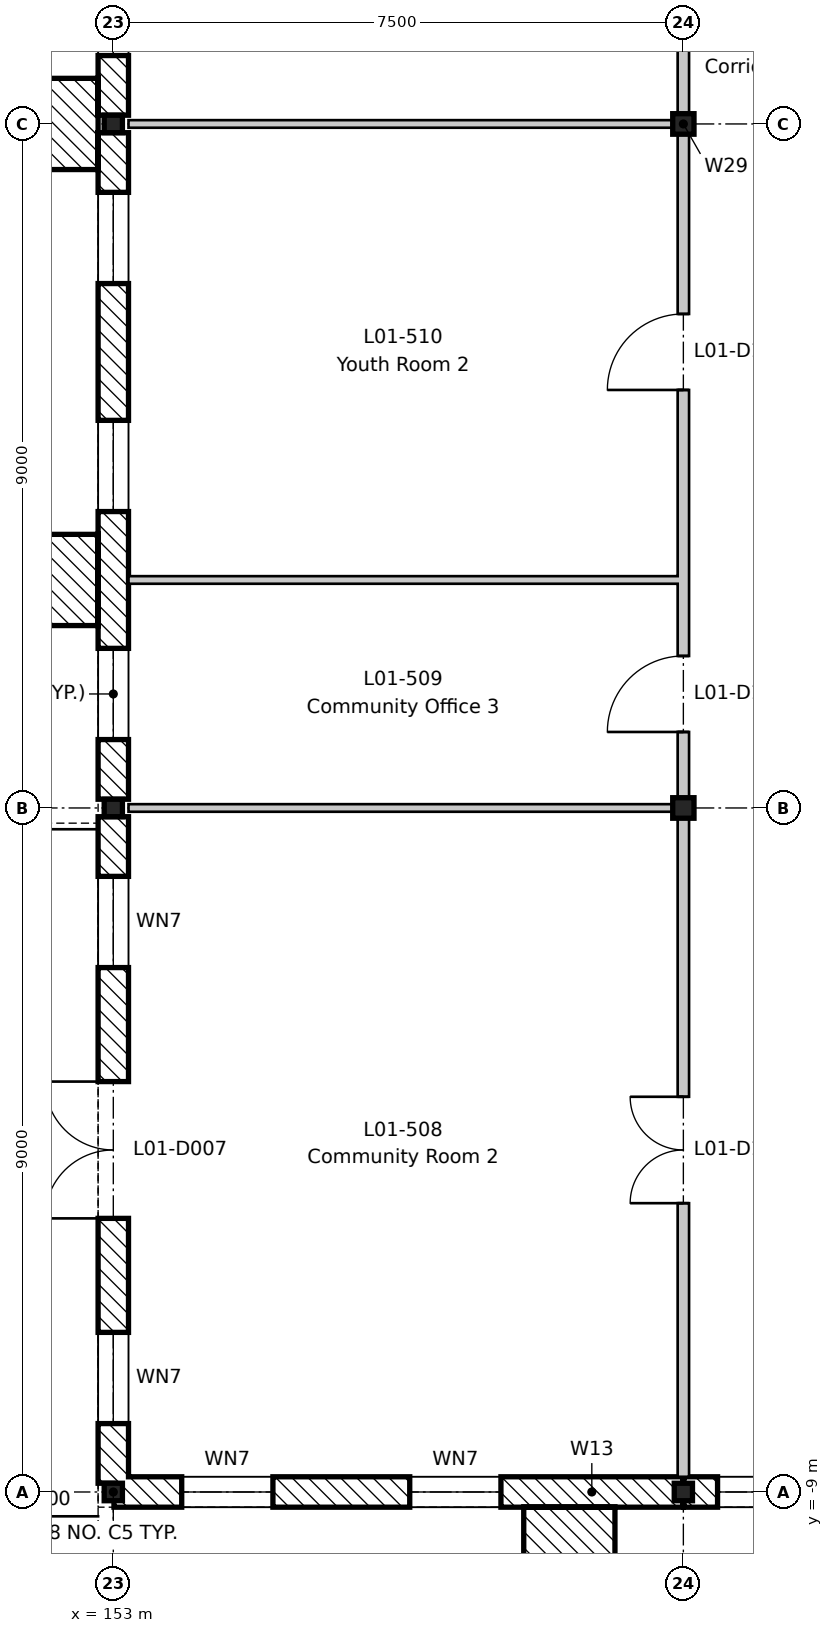
"""IFC4 building model, lengths in metres.
Left out: names, types, materials, properties, quantities, classifications, styles, units other than length and angle.
Written with IfcOpenShell. Run it as: python <this file> out.ifc"""

import sys

from ifc_helpers import new_model, si_unit, direction, frame, frame_2d, origin, origin_2d, place, context, subcontext, project, spatial, rectangle, i_section, extrude, element, fill, save


model = new_model("IFC4")
c1 = context("Model", 3, precision=1e-05, world=origin(), true_north=direction((0.0, 1.0)))
c2 = subcontext(c1, "Body", "Model", "MODEL_VIEW")
j1 = project(units=[si_unit("LENGTHUNIT", "METRE"), si_unit("PLANEANGLEUNIT", "RADIAN")], contexts=[c1])
p1 = place(None, origin())
s1 = spatial("IfcSite", under=j1, at=p1, CompositionType="ELEMENT")
p2 = place(p1, origin())
s2 = spatial("IfcBuilding", under=s1, at=p2, CompositionType="ELEMENT")
p3 = place(p2, frame((0.0, 0.0, 5.4)))
s3 = spatial("IfcBuildingStorey", under=s2, at=p3, CompositionType="ELEMENT", Elevation=5.4)
for number, where, z_axis, x_axis in (
    (1, (153.0, -9.0, -0.2), (0.0, 0.0, 1.0), (1.0, 0.0, 0.0)),
    (2, (153.0, 0.0, -0.2), (0.0, 0.0, 1.0), (1.0, 0.0, 0.0)),
    (3, (153.0, 9.0, -0.2), (0.0, 0.0, 1.0), (1.0, 0.0, 0.0)),
    (4, (160.5, -9.0, -0.2), (0.0, 0.0, 1.0), (1.0, 0.0, 0.0)),
):
    element("IfcColumn", number, at=place(p3, frame(where, z_axis=z_axis, x_axis=x_axis)), inside=s3, PredefinedType="COLUMN", context=c2, shape_type="SweptSolid", body=[
        extrude(i_section(OverallWidth=0.24, OverallDepth=0.23, WebThickness=0.008, FlangeThickness=0.012, FilletRadius=0.021, at=origin_2d()), origin(), (0.0, 0.0, 1.0), 4.5),
    ])
for number, where, z_axis, x_axis in (
    (5, (160.5, 0.0, -0.2), (0.0, 0.0, 1.0), (1.0, 0.0, 0.0)),
    (6, (160.5, 9.0, -0.2), (0.0, 0.0, 1.0), (1.0, 0.0, 0.0)),
):
    element("IfcColumn", number, at=place(p3, frame(where, z_axis=z_axis, x_axis=x_axis)), inside=s3, PredefinedType="COLUMN", context=c2, shape_type="SweptSolid", body=[
        extrude(i_section(OverallWidth=0.28, OverallDepth=0.27, WebThickness=0.008, FlangeThickness=0.013, FilletRadius=0.024, at=origin_2d()), origin(), (0.0, 0.0, 1.0), 4.5),
    ])
p4 = place(p3, frame((153.0, -8.885, 0.0), z_axis=(0.0, 0.0, 1.0), x_axis=(0.0, 1.0, 0.0)))
e7 = element("IfcWall", 7, at=p4, inside=s3, PredefinedType="STANDARD", context=c2, shape_type="SweptSolid", body=[
    extrude(rectangle(XDim=8.77, YDim=0.4, at=frame_2d((4.385, 0.0))), origin(), (0.0, 0.0, 1.0), 3.9),
])
p5 = place(p4, frame((3.485, 0.0, 0.0)))
e8 = element("IfcOpeningElement", 8, at=p5, cuts=e7, PredefinedType="OPENING", context=c2, shape_type="SweptSolid", body=[
    extrude(rectangle(XDim=1.8, YDim=2.4, at=frame_2d((0.9, 1.2))), frame((0.0, 0.21, 0.0), z_axis=(0.0, -1.0, 0.0), x_axis=(1.0, 0.0, 0.0)), (0.0, 0.0, 1.0), 0.42),
])
p6 = place(p4, frame((0.785, 0.0, 0.9)))
e9 = element("IfcOpeningElement", 9, at=p6, cuts=e7, PredefinedType="OPENING", context=c2, shape_type="SweptSolid", body=[
    extrude(rectangle(XDim=1.2, YDim=2.4, at=frame_2d((0.6, 1.2))), frame((0.0, 0.21, 0.0), z_axis=(0.0, -1.0, 0.0), x_axis=(1.0, 0.0, 0.0)), (0.0, 0.0, 1.0), 0.42),
])
p7 = place(p4, frame((6.785, 0.0, 0.9)))
e10 = element("IfcOpeningElement", 10, at=p7, cuts=e7, PredefinedType="OPENING", context=c2, shape_type="SweptSolid", body=[
    extrude(rectangle(XDim=1.2, YDim=2.4, at=frame_2d((0.6, 1.2))), frame((0.0, 0.21, 0.0), z_axis=(0.0, -1.0, 0.0), x_axis=(1.0, 0.0, 0.0)), (0.0, 0.0, 1.0), 0.42),
])
p8 = place(p3, frame((153.0, 0.115, 0.0), z_axis=(0.0, 0.0, 1.0), x_axis=(0.0, 1.0, 0.0)))
e11 = element("IfcWall", 11, at=p8, inside=s3, PredefinedType="STANDARD", context=c2, shape_type="SweptSolid", body=[
    extrude(rectangle(XDim=8.77, YDim=0.4, at=frame_2d((4.385, 0.0))), origin(), (0.0, 0.0, 1.0), 3.9),
])
p9 = place(p8, frame((0.785, 0.0, 0.9)))
e12 = element("IfcOpeningElement", 12, at=p9, cuts=e11, PredefinedType="OPENING", context=c2, shape_type="SweptSolid", body=[
    extrude(rectangle(XDim=1.2, YDim=2.4, at=frame_2d((0.6, 1.2))), frame((0.0, 0.21, 0.0), z_axis=(0.0, -1.0, 0.0), x_axis=(1.0, 0.0, 0.0)), (0.0, 0.0, 1.0), 0.42),
])
p10 = place(p8, frame((3.785, 0.0, 0.9)))
e13 = element("IfcOpeningElement", 13, at=p10, cuts=e11, PredefinedType="OPENING", context=c2, shape_type="SweptSolid", body=[
    extrude(rectangle(XDim=1.2, YDim=2.4, at=frame_2d((0.6, 1.2))), frame((0.0, 0.21, 0.0), z_axis=(0.0, -1.0, 0.0), x_axis=(1.0, 0.0, 0.0)), (0.0, 0.0, 1.0), 0.42),
])
p11 = place(p8, frame((6.785, 0.0, 0.9)))
e14 = element("IfcOpeningElement", 14, at=p11, cuts=e11, PredefinedType="OPENING", context=c2, shape_type="SweptSolid", body=[
    extrude(rectangle(XDim=1.2, YDim=2.4, at=frame_2d((0.6, 1.2))), frame((0.0, 0.21, 0.0), z_axis=(0.0, -1.0, 0.0), x_axis=(1.0, 0.0, 0.0)), (0.0, 0.0, 1.0), 0.42),
])
p12 = place(p3, frame((153.0, 9.115, 0.0), z_axis=(0.0, 0.0, 1.0), x_axis=(0.0, 1.0, 0.0)))
e15 = element("IfcWall", 15, at=p12, inside=s3, PredefinedType="STANDARD", context=c2, shape_type="SweptSolid", body=[
    extrude(rectangle(XDim=8.77, YDim=0.4, at=frame_2d((4.385, 0.0))), origin(), (0.0, 0.0, 1.0), 3.9),
])
p13 = place(p12, frame((0.785, 0.0, 0.9)))
e16 = element("IfcOpeningElement", 16, at=p13, cuts=e15, PredefinedType="OPENING", context=c2, shape_type="SweptSolid", body=[
    extrude(rectangle(XDim=1.2, YDim=2.4, at=frame_2d((0.6, 1.2))), frame((0.0, 0.21, 0.0), z_axis=(0.0, -1.0, 0.0), x_axis=(1.0, 0.0, 0.0)), (0.0, 0.0, 1.0), 0.42),
])
p14 = place(p12, frame((3.785, 0.0, 0.9)))
e17 = element("IfcOpeningElement", 17, at=p14, cuts=e15, PredefinedType="OPENING", context=c2, shape_type="SweptSolid", body=[
    extrude(rectangle(XDim=1.2, YDim=2.4, at=frame_2d((0.6, 1.2))), frame((0.0, 0.21, 0.0), z_axis=(0.0, -1.0, 0.0), x_axis=(1.0, 0.0, 0.0)), (0.0, 0.0, 1.0), 0.42),
])
p15 = place(p12, frame((6.785, 0.0, 0.9)))
e18 = element("IfcOpeningElement", 18, at=p15, cuts=e15, PredefinedType="OPENING", context=c2, shape_type="SweptSolid", body=[
    extrude(rectangle(XDim=1.2, YDim=2.4, at=frame_2d((0.6, 1.2))), frame((0.0, 0.21, 0.0), z_axis=(0.0, -1.0, 0.0), x_axis=(1.0, 0.0, 0.0)), (0.0, 0.0, 1.0), 0.42),
])
p16 = place(p3, frame((160.491, -9.0, 0.0), z_axis=(0.0, 0.0, 1.0), x_axis=(-1.0, 0.0, 0.0)))
e19 = element("IfcWall", 19, at=p16, inside=s3, PredefinedType="STANDARD", context=c2, shape_type="SweptSolid", body=[
    extrude(rectangle(XDim=7.482, YDim=0.4, at=frame_2d((3.741, 0.0))), origin(), (0.0, 0.0, 1.0), 3.97),
])
p17 = place(p16, frame((5.391, 0.0, 0.9)))
e20 = element("IfcOpeningElement", 20, at=p17, cuts=e19, PredefinedType="OPENING", context=c2, shape_type="SweptSolid", body=[
    extrude(rectangle(XDim=1.2, YDim=2.4, at=frame_2d((0.6, 1.2))), frame((0.0, 0.21, 0.0), z_axis=(0.0, -1.0, 0.0), x_axis=(1.0, 0.0, 0.0)), (0.0, 0.0, 1.0), 0.42),
])
p18 = place(p16, frame((2.391, 0.0, 0.9)))
e21 = element("IfcOpeningElement", 21, at=p18, cuts=e19, PredefinedType="OPENING", context=c2, shape_type="SweptSolid", body=[
    extrude(rectangle(XDim=1.2, YDim=2.4, at=frame_2d((0.6, 1.2))), frame((0.0, 0.21, 0.0), z_axis=(0.0, -1.0, 0.0), x_axis=(1.0, 0.0, 0.0)), (0.0, 0.0, 1.0), 0.42),
])
p19 = place(p3, frame((163.491, -9.0, 0.0), z_axis=(0.0, 0.0, 1.0), x_axis=(-1.0, 0.0, 0.0)))
e22 = element("IfcWall", 22, at=p19, inside=s3, PredefinedType="STANDARD", context=c2, shape_type="SweptSolid", body=[
    extrude(rectangle(XDim=2.982, YDim=0.4, at=frame_2d((1.491, 0.0))), origin(), (0.0, 0.0, 1.0), 4.1),
])
p20 = place(p19, frame((0.441, 0.0, 0.9)))
e23 = element("IfcOpeningElement", 23, at=p20, cuts=e22, PredefinedType="OPENING", context=c2, shape_type="SweptSolid", body=[
    extrude(rectangle(XDim=2.1, YDim=2.1, at=frame_2d((1.05, 1.05))), frame((0.0, 0.21, 0.0), z_axis=(0.0, -1.0, 0.0), x_axis=(1.0, 0.0, 0.0)), (0.0, 0.0, 1.0), 0.42),
])
for number, where, z_axis, x_axis in (
    (24, (152.2, 2.4, 0.0), (0.0, 0.0, 1.0), (0.0, 1.0, 0.0)),
    (25, (152.2, 8.4, 0.0), (0.0, 0.0, 1.0), (0.0, 1.0, 0.0)),
    (26, (158.4, -9.8, 0.0), (0.0, 0.0, 1.0), (1.0, 0.0, 0.0)),
):
    element("IfcWall", number, at=place(p3, frame(where, z_axis=z_axis, x_axis=x_axis)), inside=s3, PredefinedType="STANDARD", context=c2, shape_type="SweptSolid", body=[
        extrude(rectangle(XDim=1.2, YDim=1.2, at=frame_2d((0.6, 0.0))), origin(), (0.0, 0.0, 1.0), 4.5),
    ])
p21 = place(p3, frame((153.2, 0.0, 0.0), z_axis=(0.0, 0.0, 1.0), x_axis=(1.0, 0.0, 0.0)))
e27 = element("IfcWall", 27, at=p21, inside=s3, PredefinedType="PARTITIONING", context=c2, shape_type="SweptSolid", body=[
    extrude(rectangle(XDim=7.225, YDim=0.1, at=frame_2d((3.613, 0.0))), origin(), (0.0, 0.0, 1.0), 3.95),
])
p22 = place(p3, frame((153.2, 3.0, 0.0), z_axis=(0.0, 0.0, 1.0), x_axis=(1.0, 0.0, 0.0)))
e28 = element("IfcWall", 28, at=p22, inside=s3, PredefinedType="PARTITIONING", context=c2, shape_type="SweptSolid", body=[
    extrude(rectangle(XDim=7.225, YDim=0.1, at=frame_2d((3.613, 0.0))), origin(), (0.0, 0.0, 1.0), 4.3),
])
p23 = place(p3, frame((153.2, 9.0, 0.0), z_axis=(0.0, 0.0, 1.0), x_axis=(1.0, 0.0, 0.0)))
e29 = element("IfcWall", 29, at=p23, inside=s3, PredefinedType="PARTITIONING", context=c2, shape_type="SweptSolid", body=[
    extrude(rectangle(XDim=7.225, YDim=0.1, at=frame_2d((3.613, 0.0))), origin(), (0.0, 0.0, 1.0), 3.95),
])
p24 = place(p3, frame((160.5, -8.8, 0.0), z_axis=(0.0, 0.0, 1.0), x_axis=(0.0, 1.0, 0.0)))
e30 = element("IfcWall", 30, at=p24, inside=s3, PredefinedType="PARTITIONING", context=c2, shape_type="SweptSolid", body=[
    extrude(rectangle(XDim=62.6, YDim=0.15, at=frame_2d((31.3, 0.0))), origin(), (0.0, 0.0, 1.0), 3.78),
])
p25 = place(p24, frame((3.6, 0.0, 0.0)))
e31 = element("IfcOpeningElement", 31, at=p25, cuts=e30, PredefinedType="OPENING", context=c2, shape_type="SweptSolid", body=[
    extrude(rectangle(XDim=1.4, YDim=2.1, at=frame_2d((0.7, 1.05))), frame((0.0, 0.085, 0.0), z_axis=(0.0, -1.0, 0.0), x_axis=(1.0, 0.0, 0.0)), (0.0, 0.0, 1.0), 0.17),
])
p26 = place(p24, frame((9.8, 0.0, 0.0)))
e32 = element("IfcOpeningElement", 32, at=p26, cuts=e30, PredefinedType="OPENING", context=c2, shape_type="SweptSolid", body=[
    extrude(rectangle(XDim=1.0, YDim=2.1, at=frame_2d((0.5, 1.05))), frame((0.0, 0.085, 0.0), z_axis=(0.0, -1.0, 0.0), x_axis=(1.0, 0.0, 0.0)), (0.0, 0.0, 1.0), 0.17),
])
p27 = place(p24, frame((14.3, 0.0, 0.0)))
e33 = element("IfcOpeningElement", 33, at=p27, cuts=e30, PredefinedType="OPENING", context=c2, shape_type="SweptSolid", body=[
    extrude(rectangle(XDim=1.0, YDim=2.1, at=frame_2d((0.5, 1.05))), frame((0.0, 0.085, 0.0), z_axis=(0.0, -1.0, 0.0), x_axis=(1.0, 0.0, 0.0)), (0.0, 0.0, 1.0), 0.17),
])
p28 = place(p24, frame((20.3, 0.0, 0.0)))
e34 = element("IfcOpeningElement", 34, at=p28, cuts=e30, PredefinedType="OPENING", context=c2, shape_type="SweptSolid", body=[
    extrude(rectangle(XDim=1.0, YDim=2.1, at=frame_2d((0.5, 1.05))), frame((0.0, 0.085, 0.0), z_axis=(0.0, -1.0, 0.0), x_axis=(1.0, 0.0, 0.0)), (0.0, 0.0, 1.0), 0.17),
])
p29 = place(p24, frame((24.8, 0.0, 0.0)))
e35 = element("IfcOpeningElement", 35, at=p29, cuts=e30, PredefinedType="OPENING", context=c2, shape_type="SweptSolid", body=[
    extrude(rectangle(XDim=1.0, YDim=2.1, at=frame_2d((0.5, 1.05))), frame((0.0, 0.085, 0.0), z_axis=(0.0, -1.0, 0.0), x_axis=(1.0, 0.0, 0.0)), (0.0, 0.0, 1.0), 0.17),
])
p30 = place(p24, frame((27.8, 0.0, 0.0)))
e36 = element("IfcOpeningElement", 36, at=p30, cuts=e30, PredefinedType="OPENING", context=c2, shape_type="SweptSolid", body=[
    extrude(rectangle(XDim=1.0, YDim=2.1, at=frame_2d((0.5, 1.05))), frame((0.0, 0.085, 0.0), z_axis=(0.0, -1.0, 0.0), x_axis=(1.0, 0.0, 0.0)), (0.0, 0.0, 1.0), 0.17),
])
p31 = place(p24, frame((32.3, 0.0, 0.0)))
e37 = element("IfcOpeningElement", 37, at=p31, cuts=e30, PredefinedType="OPENING", context=c2, shape_type="SweptSolid", body=[
    extrude(rectangle(XDim=1.0, YDim=2.1, at=frame_2d((0.5, 1.05))), frame((0.0, 0.085, 0.0), z_axis=(0.0, -1.0, 0.0), x_axis=(1.0, 0.0, 0.0)), (0.0, 0.0, 1.0), 0.17),
])
p32 = place(p24, frame((36.8, 0.0, 0.0)))
e38 = element("IfcOpeningElement", 38, at=p32, cuts=e30, PredefinedType="OPENING", context=c2, shape_type="SweptSolid", body=[
    extrude(rectangle(XDim=1.0, YDim=2.1, at=frame_2d((0.5, 1.05))), frame((0.0, 0.085, 0.0), z_axis=(0.0, -1.0, 0.0), x_axis=(1.0, 0.0, 0.0)), (0.0, 0.0, 1.0), 0.17),
])
p33 = place(p24, frame((39.8, 0.0, 0.0)))
e39 = element("IfcOpeningElement", 39, at=p33, cuts=e30, PredefinedType="OPENING", context=c2, shape_type="SweptSolid", body=[
    extrude(rectangle(XDim=1.0, YDim=2.1, at=frame_2d((0.5, 1.05))), frame((0.0, 0.085, 0.0), z_axis=(0.0, -1.0, 0.0), x_axis=(1.0, 0.0, 0.0)), (0.0, 0.0, 1.0), 0.17),
])
p34 = place(p24, frame((45.6, 0.0, 0.0)))
e40 = element("IfcOpeningElement", 40, at=p34, cuts=e30, PredefinedType="OPENING", context=c2, shape_type="SweptSolid", body=[
    extrude(rectangle(XDim=1.4, YDim=2.1, at=frame_2d((0.7, 1.05))), frame((0.0, 0.085, 0.0), z_axis=(0.0, -1.0, 0.0), x_axis=(1.0, 0.0, 0.0)), (0.0, 0.0, 1.0), 0.17),
])
p35 = place(p24, frame((54.55, 0.0, 0.0)))
e41 = element("IfcOpeningElement", 41, at=p35, cuts=e30, PredefinedType="OPENING", context=c2, shape_type="SweptSolid", body=[
    extrude(rectangle(XDim=1.0, YDim=2.1, at=frame_2d((0.5, 1.05))), frame((0.0, 0.085, 0.0), z_axis=(0.0, -1.0, 0.0), x_axis=(1.0, 0.0, 0.0)), (0.0, 0.0, 1.0), 0.17),
])
p36 = place(p24, frame((57.8, 0.0, 0.0)))
e42 = element("IfcOpeningElement", 42, at=p36, cuts=e30, PredefinedType="OPENING", context=c2, shape_type="SweptSolid", body=[
    extrude(rectangle(XDim=1.0, YDim=2.1, at=frame_2d((0.5, 1.05))), frame((0.0, 0.085, 0.0), z_axis=(0.0, -1.0, 0.0), x_axis=(1.0, 0.0, 0.0)), (0.0, 0.0, 1.0), 0.17),
])
p37 = place(p24, frame((60.8, 0.0, 0.0)))
e43 = element("IfcOpeningElement", 43, at=p37, cuts=e30, PredefinedType="OPENING", context=c2, shape_type="SweptSolid", body=[
    extrude(rectangle(XDim=1.0, YDim=2.1, at=frame_2d((0.5, 1.05))), frame((0.0, 0.085, 0.0), z_axis=(0.0, -1.0, 0.0), x_axis=(1.0, 0.0, 0.0)), (0.0, 0.0, 1.0), 0.17),
])
p38 = place(p5, origin())
e44 = element("IfcDoor", 44, at=p38, inside=s3, OperationType="DOUBLE_DOOR_SINGLE_SWING", PredefinedType="DOOR", context=c2, shape_type="SweptSolid", body=[
    extrude(rectangle(XDim=1.8, YDim=2.4, at=frame_2d((0.9, 1.2))), frame((0.0, 0.025, 0.0), z_axis=(0.0, -1.0, 0.0), x_axis=(1.0, 0.0, 0.0)), (0.0, 0.0, 1.0), 0.05),
])
fill(e8, e44)
p39 = place(p6, origin())
e45 = element("IfcWindow", 45, at=p39, inside=s3, PartitioningType="SINGLE_PANEL", PredefinedType="WINDOW", context=c2, shape_type="SweptSolid", body=[
    extrude(rectangle(XDim=1.2, YDim=2.4, at=frame_2d((0.6, 1.2))), frame((0.0, -0.12, 0.0), z_axis=(0.0, -1.0, 0.0), x_axis=(1.0, 0.0, 0.0)), (0.0, 0.0, 1.0), 0.06),
])
fill(e9, e45)
p40 = place(p7, origin())
e46 = element("IfcWindow", 46, at=p40, inside=s3, PartitioningType="SINGLE_PANEL", PredefinedType="WINDOW", context=c2, shape_type="SweptSolid", body=[
    extrude(rectangle(XDim=1.2, YDim=2.4, at=frame_2d((0.6, 1.2))), frame((0.0, -0.12, 0.0), z_axis=(0.0, -1.0, 0.0), x_axis=(1.0, 0.0, 0.0)), (0.0, 0.0, 1.0), 0.06),
])
fill(e10, e46)
p41 = place(p9, origin())
e47 = element("IfcWindow", 47, at=p41, inside=s3, PartitioningType="SINGLE_PANEL", PredefinedType="WINDOW", context=c2, shape_type="SweptSolid", body=[
    extrude(rectangle(XDim=1.2, YDim=2.4, at=frame_2d((0.6, 1.2))), frame((0.0, -0.12, 0.0), z_axis=(0.0, -1.0, 0.0), x_axis=(1.0, 0.0, 0.0)), (0.0, 0.0, 1.0), 0.06),
])
fill(e12, e47)
p42 = place(p10, origin())
e48 = element("IfcWindow", 48, at=p42, inside=s3, PartitioningType="SINGLE_PANEL", PredefinedType="WINDOW", context=c2, shape_type="SweptSolid", body=[
    extrude(rectangle(XDim=1.2, YDim=2.4, at=frame_2d((0.6, 1.2))), frame((0.0, -0.12, 0.0), z_axis=(0.0, -1.0, 0.0), x_axis=(1.0, 0.0, 0.0)), (0.0, 0.0, 1.0), 0.06),
])
fill(e13, e48)
p43 = place(p11, origin())
e49 = element("IfcWindow", 49, at=p43, inside=s3, PartitioningType="SINGLE_PANEL", PredefinedType="WINDOW", context=c2, shape_type="SweptSolid", body=[
    extrude(rectangle(XDim=1.2, YDim=2.4, at=frame_2d((0.6, 1.2))), frame((0.0, -0.12, 0.0), z_axis=(0.0, -1.0, 0.0), x_axis=(1.0, 0.0, 0.0)), (0.0, 0.0, 1.0), 0.06),
])
fill(e14, e49)
p44 = place(p13, origin())
e50 = element("IfcWindow", 50, at=p44, inside=s3, PartitioningType="SINGLE_PANEL", PredefinedType="WINDOW", context=c2, shape_type="SweptSolid", body=[
    extrude(rectangle(XDim=1.2, YDim=2.4, at=frame_2d((0.6, 1.2))), frame((0.0, -0.12, 0.0), z_axis=(0.0, -1.0, 0.0), x_axis=(1.0, 0.0, 0.0)), (0.0, 0.0, 1.0), 0.06),
])
fill(e16, e50)
p45 = place(p17, origin())
e51 = element("IfcWindow", 51, at=p45, inside=s3, PartitioningType="SINGLE_PANEL", PredefinedType="WINDOW", context=c2, shape_type="SweptSolid", body=[
    extrude(rectangle(XDim=1.2, YDim=2.4, at=frame_2d((0.6, 1.2))), frame((0.0, -0.12, 0.0), z_axis=(0.0, -1.0, 0.0), x_axis=(1.0, 0.0, 0.0)), (0.0, 0.0, 1.0), 0.06),
])
fill(e20, e51)
p46 = place(p18, origin())
e52 = element("IfcWindow", 52, at=p46, inside=s3, PartitioningType="SINGLE_PANEL", PredefinedType="WINDOW", context=c2, shape_type="SweptSolid", body=[
    extrude(rectangle(XDim=1.2, YDim=2.4, at=frame_2d((0.6, 1.2))), frame((0.0, -0.12, 0.0), z_axis=(0.0, -1.0, 0.0), x_axis=(1.0, 0.0, 0.0)), (0.0, 0.0, 1.0), 0.06),
])
fill(e21, e52)
p47 = place(p20, origin())
e53 = element("IfcWindow", 53, at=p47, inside=s3, PartitioningType="SINGLE_PANEL", PredefinedType="WINDOW", context=c2, shape_type="SweptSolid", body=[
    extrude(rectangle(XDim=2.1, YDim=2.1, at=frame_2d((1.05, 1.05))), frame((0.0, -0.12, 0.0), z_axis=(0.0, -1.0, 0.0), x_axis=(1.0, 0.0, 0.0)), (0.0, 0.0, 1.0), 0.06),
])
fill(e23, e53)
p48 = place(p25, origin())
e54 = element("IfcDoor", 54, at=p48, inside=s3, OperationType="DOUBLE_DOOR_SINGLE_SWING", PredefinedType="DOOR", context=c2, shape_type="SweptSolid", body=[
    extrude(rectangle(XDim=1.4, YDim=2.1, at=frame_2d((0.7, 1.05))), frame((0.0, 0.025, 0.0), z_axis=(0.0, -1.0, 0.0), x_axis=(1.0, 0.0, 0.0)), (0.0, 0.0, 1.0), 0.05),
])
fill(e31, e54)
p49 = place(p26, origin())
e55 = element("IfcDoor", 55, at=p49, inside=s3, OperationType="SINGLE_SWING_LEFT", PredefinedType="DOOR", context=c2, shape_type="SweptSolid", body=[
    extrude(rectangle(XDim=1.0, YDim=2.1, at=frame_2d((0.5, 1.05))), frame((0.0, 0.025, 0.0), z_axis=(0.0, -1.0, 0.0), x_axis=(1.0, 0.0, 0.0)), (0.0, 0.0, 1.0), 0.05),
])
fill(e32, e55)
p50 = place(p27, origin())
e56 = element("IfcDoor", 56, at=p50, inside=s3, OperationType="SINGLE_SWING_LEFT", PredefinedType="DOOR", context=c2, shape_type="SweptSolid", body=[
    extrude(rectangle(XDim=1.0, YDim=2.1, at=frame_2d((0.5, 1.05))), frame((0.0, 0.025, 0.0), z_axis=(0.0, -1.0, 0.0), x_axis=(1.0, 0.0, 0.0)), (0.0, 0.0, 1.0), 0.05),
])
fill(e33, e56)
save(model, sys.argv[1])
